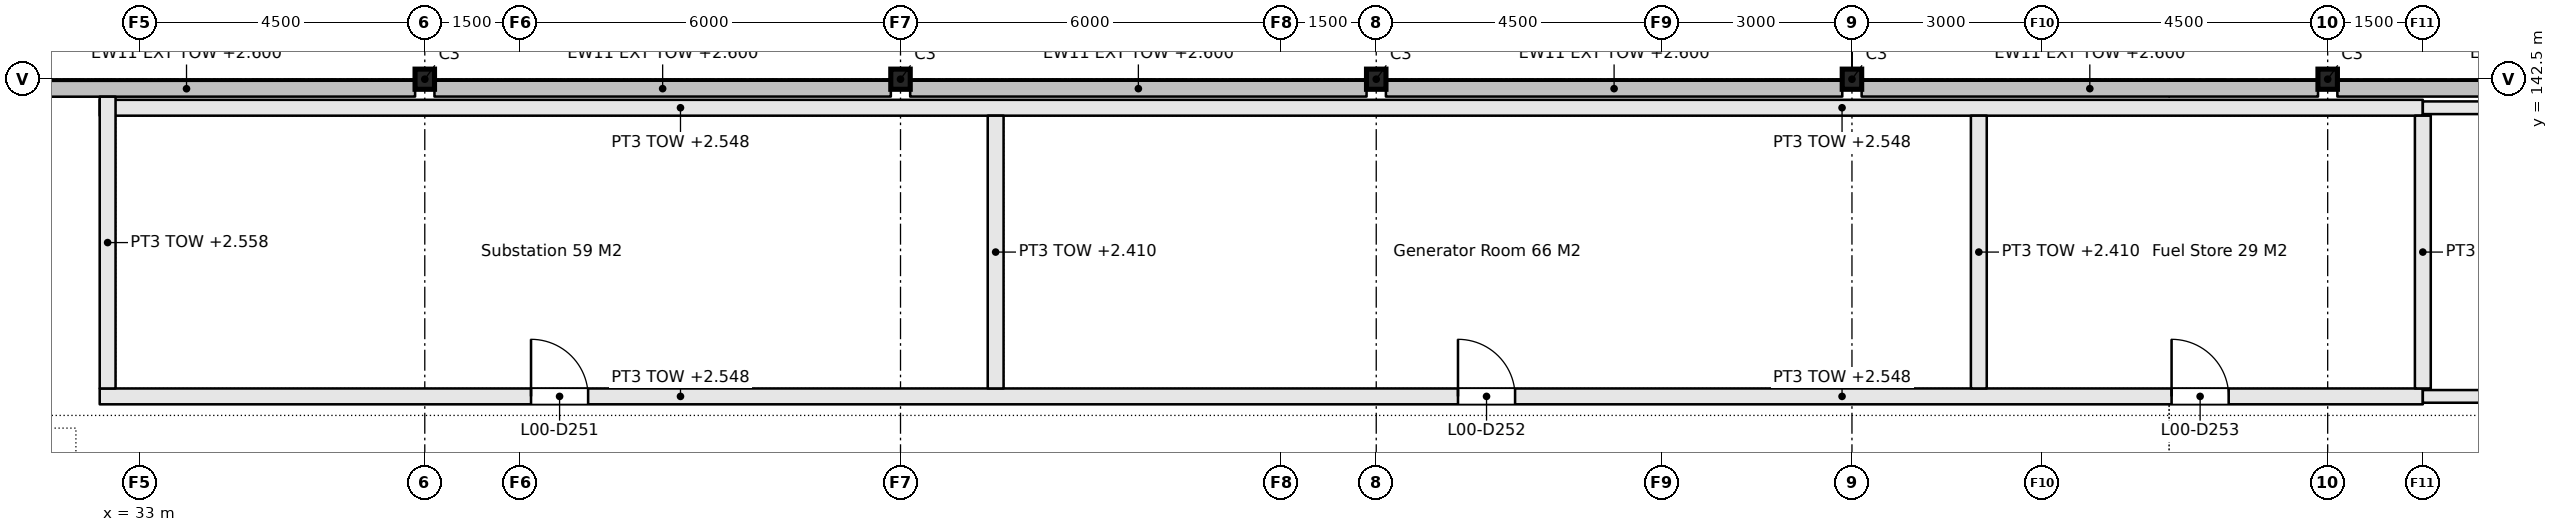
"""IFC4 building model, lengths in metres.
Left out: names, types, materials, properties, quantities, classifications, styles, units other than length and angle.
Written with IfcOpenShell. Run it as: python <this file> out.ifc"""

import sys

from ifc_helpers import new_model, si_unit, direction, frame, frame_2d, origin, origin_2d, place, context, subcontext, project, spatial, rectangle, i_section, extrude, element, fill, save


model = new_model("IFC4")
c1 = context("Model", 3, precision=1e-05, world=origin(), true_north=direction((0.0, 1.0)))
c2 = subcontext(c1, "Body", "Model", "MODEL_VIEW")
j1 = project(units=[si_unit("LENGTHUNIT", "METRE"), si_unit("PLANEANGLEUNIT", "RADIAN")], contexts=[c1])
p1 = place(None, origin())
s1 = spatial("IfcSite", under=j1, at=p1, CompositionType="ELEMENT")
p2 = place(p1, origin())
s2 = spatial("IfcBuilding", under=s1, at=p2, CompositionType="ELEMENT")
p3 = place(p2, origin())
s3 = spatial("IfcBuildingStorey", under=s2, at=p3, CompositionType="ELEMENT", Elevation=0.0)
for number, where, z_axis, x_axis in (
    (1, (37.5, 142.5, -0.25), (0.0, 0.0, 1.0), (1.0, 0.0, 0.0)),
    (2, (45.0, 142.5, -0.25), (0.0, 0.0, 1.0), (1.0, 0.0, 0.0)),
    (3, (52.5, 142.5, -0.25), (0.0, 0.0, 1.0), (1.0, 0.0, 0.0)),
    (4, (60.0, 142.5, -0.25), (0.0, 0.0, 1.0), (1.0, 0.0, 0.0)),
    (5, (67.5, 142.5, -0.25), (0.0, 0.0, 1.0), (1.0, 0.0, 0.0)),
):
    element("IfcColumn", number, at=place(p3, frame(where, z_axis=z_axis, x_axis=x_axis)), inside=s3, PredefinedType="COLUMN", context=c2, shape_type="SweptSolid", body=[
        extrude(i_section(OverallWidth=0.307, OverallDepth=0.318, WebThickness=0.013, FlangeThickness=0.021, FilletRadius=0.015, at=origin_2d()), origin(), (0.0, 0.0, 1.0), 3.55),
    ])
p4 = place(p3, frame((32.375, 137.5, 0.0), z_axis=(0.0, 0.0, 1.0), x_axis=(1.0, 0.0, 0.0)))
e6 = element("IfcWall", 6, at=p4, inside=s3, PredefinedType="PARTITIONING", context=c2, shape_type="SweptSolid", body=[
    extrude(rectangle(XDim=36.625, YDim=0.25, at=frame_2d((18.312, 0.0))), origin(), (0.0, 0.0, 1.0), 2.548),
])
p5 = place(p4, frame((6.8, 0.0, 0.0)))
e7 = element("IfcOpeningElement", 7, at=p5, cuts=e6, PredefinedType="OPENING", context=c2, shape_type="SweptSolid", body=[
    extrude(rectangle(XDim=0.9, YDim=2.1, at=frame_2d((0.45, 1.05))), frame((0.0, 0.135, 0.0), z_axis=(0.0, -1.0, 0.0), x_axis=(1.0, 0.0, 0.0)), (0.0, 0.0, 1.0), 0.27),
])
p6 = place(p4, frame((21.414, 0.0, 0.0)))
e8 = element("IfcOpeningElement", 8, at=p6, cuts=e6, PredefinedType="OPENING", context=c2, shape_type="SweptSolid", body=[
    extrude(rectangle(XDim=0.9, YDim=2.1, at=frame_2d((0.45, 1.05))), frame((0.0, 0.135, 0.0), z_axis=(0.0, -1.0, 0.0), x_axis=(1.0, 0.0, 0.0)), (0.0, 0.0, 1.0), 0.27),
])
p7 = place(p4, frame((32.664, 0.0, 0.0)))
e9 = element("IfcOpeningElement", 9, at=p7, cuts=e6, PredefinedType="OPENING", context=c2, shape_type="SweptSolid", body=[
    extrude(rectangle(XDim=0.9, YDim=2.1, at=frame_2d((0.45, 1.05))), frame((0.0, 0.135, 0.0), z_axis=(0.0, -1.0, 0.0), x_axis=(1.0, 0.0, 0.0)), (0.0, 0.0, 1.0), 0.27),
])
p8 = place(p3, frame((69.0, 137.5, 0.0), z_axis=(0.0, 0.0, 1.0), x_axis=(1.0, 0.0, 0.0)))
e10 = element("IfcWall", 10, at=p8, inside=s3, PredefinedType="PARTITIONING", context=c2, shape_type="SweptSolid", body=[
    extrude(rectangle(XDim=9.0, YDim=0.2, at=frame_2d((4.5, 0.0))), origin(), (0.0, 0.0, 1.0), 2.548),
])
p9 = place(p8, frame((4.05, 0.0, 0.0)))
e11 = element("IfcOpeningElement", 11, at=p9, cuts=e10, PredefinedType="OPENING", context=c2, shape_type="SweptSolid", body=[
    extrude(rectangle(XDim=0.9, YDim=2.1, at=frame_2d((0.45, 1.05))), frame((0.0, 0.11, 0.0), z_axis=(0.0, -1.0, 0.0), x_axis=(1.0, 0.0, 0.0)), (0.0, 0.0, 1.0), 0.22),
])
p10 = place(p3, frame((32.375, 142.05, 0.0), z_axis=(0.0, 0.0, 1.0), x_axis=(1.0, 0.0, 0.0)))
e12 = element("IfcWall", 12, at=p10, inside=s3, PredefinedType="PARTITIONING", context=c2, shape_type="SweptSolid", body=[
    extrude(rectangle(XDim=36.625, YDim=0.25, at=frame_2d((18.312, 0.0))), origin(), (0.0, 0.0, 1.0), 2.548),
])
p11 = place(p3, frame((69.0, 142.05, 0.0), z_axis=(0.0, 0.0, 1.0), x_axis=(1.0, 0.0, 0.0)))
e13 = element("IfcWall", 13, at=p11, inside=s3, PredefinedType="PARTITIONING", context=c2, shape_type="SweptSolid", body=[
    extrude(rectangle(XDim=9.0, YDim=0.2, at=frame_2d((4.5, 0.0))), origin(), (0.0, 0.0, 1.0), 2.548),
])
p12 = place(p3, frame((32.5, 137.625, 0.0), z_axis=(0.0, 0.0, 1.0), x_axis=(0.0, 1.0, 0.0)))
e14 = element("IfcWall", 14, at=p12, inside=s3, PredefinedType="PARTITIONING", context=c2, shape_type="SweptSolid", body=[
    extrude(rectangle(XDim=4.599, YDim=0.25, at=frame_2d((2.3, 0.0))), origin(), (0.0, 0.0, 1.0), 2.558),
])
for number, where, z_axis, x_axis in (
    (15, (46.5, 137.625, 0.0), (0.0, 0.0, 1.0), (0.0, 1.0, 0.0)),
    (16, (62.0, 137.625, 0.0), (0.0, 0.0, 1.0), (0.0, 1.0, 0.0)),
    (17, (69.0, 137.625, 0.0), (0.0, 0.0, 1.0), (0.0, 1.0, 0.0)),
):
    element("IfcWall", number, at=place(p3, frame(where, z_axis=z_axis, x_axis=x_axis)), inside=s3, PredefinedType="PARTITIONING", context=c2, shape_type="SweptSolid", body=[
        extrude(rectangle(XDim=4.3, YDim=0.25, at=frame_2d((2.15, 0.0))), origin(), (0.0, 0.0, 1.0), 2.41),
    ])
for number, where, z_axis, x_axis in (
    (18, (74.847, 142.351, 0.0), (0.0, 0.0, 1.0), (-1.0, 0.0, 0.0)),
    (19, (67.347, 142.351, 0.0), (0.0, 0.0, 1.0), (-1.0, 0.0, 0.0)),
    (20, (59.847, 142.351, 0.0), (0.0, 0.0, 1.0), (-1.0, 0.0, 0.0)),
    (21, (52.347, 142.351, 0.0), (0.0, 0.0, 1.0), (-1.0, 0.0, 0.0)),
    (22, (44.847, 142.351, 0.0), (0.0, 0.0, 1.0), (-1.0, 0.0, 0.0)),
):
    element("IfcWall", number, at=place(p3, frame(where, z_axis=z_axis, x_axis=x_axis)), inside=s3, PredefinedType="SOLIDWALL", context=c2, shape_type="SweptSolid", body=[
        extrude(rectangle(XDim=7.195, YDim=0.25, at=frame_2d((3.597, 0.0))), origin(), (0.0, 0.0, 1.0), 2.6),
    ])
p13 = place(p3, frame((37.347, 142.351, 0.0), z_axis=(0.0, 0.0, 1.0), x_axis=(-0.999999917388, -0.000406476492, 0.0)))
e23 = element("IfcWall", 23, at=p13, inside=s3, PredefinedType="SOLIDWALL", context=c2, shape_type="SweptSolid", body=[
    extrude(rectangle(XDim=7.208, YDim=0.25, at=frame_2d((3.604, 0.0))), origin(), (0.0, 0.0, 1.0), 2.6),
])
p14 = place(p5, origin())
e24 = element("IfcDoor", 24, at=p14, inside=s3, OperationType="SINGLE_SWING_LEFT", PredefinedType="DOOR", context=c2, shape_type="SweptSolid", body=[
    extrude(rectangle(XDim=0.9, YDim=2.1, at=frame_2d((0.45, 1.05))), frame((0.0, 0.025, 0.0), z_axis=(0.0, -1.0, 0.0), x_axis=(1.0, 0.0, 0.0)), (0.0, 0.0, 1.0), 0.05),
])
fill(e7, e24)
p15 = place(p6, origin())
e25 = element("IfcDoor", 25, at=p15, inside=s3, OperationType="SINGLE_SWING_RIGHT", PredefinedType="DOOR", context=c2, shape_type="SweptSolid", body=[
    extrude(rectangle(XDim=0.9, YDim=2.1, at=frame_2d((0.45, 1.05))), frame((0.0, 0.025, 0.0), z_axis=(0.0, -1.0, 0.0), x_axis=(1.0, 0.0, 0.0)), (0.0, 0.0, 1.0), 0.05),
])
fill(e8, e25)
p16 = place(p7, origin())
e26 = element("IfcDoor", 26, at=p16, inside=s3, OperationType="SINGLE_SWING_RIGHT", PredefinedType="DOOR", context=c2, shape_type="SweptSolid", body=[
    extrude(rectangle(XDim=0.9, YDim=2.1, at=frame_2d((0.45, 1.05))), frame((0.0, 0.025, 0.0), z_axis=(0.0, -1.0, 0.0), x_axis=(1.0, 0.0, 0.0)), (0.0, 0.0, 1.0), 0.05),
])
fill(e9, e26)
save(model, sys.argv[1])
